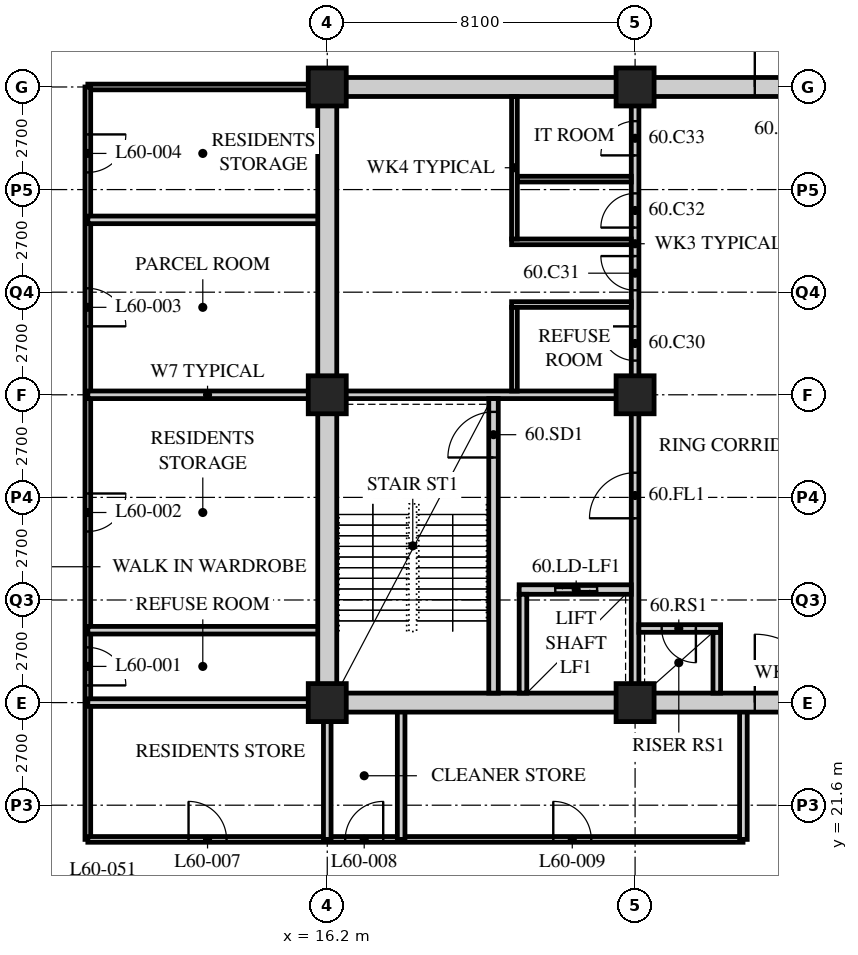
"""IFC4 building model, lengths in metres.
Left out: names, types, materials, properties, quantities, classifications, styles, units other than length and angle.
Written with IfcOpenShell. Run it as: python <this file> out.ifc"""

import sys

from ifc_helpers import new_model, si_unit, direction, frame, frame_2d, origin, origin_2d, place, context, subcontext, project, spatial, rectangle, hollow_rectangle, extrude, element, fill, save


model = new_model("IFC4")
c1 = context("Model", 3, precision=1e-05, world=origin(), true_north=direction((0.0, 1.0)))
c2 = subcontext(c1, "Body", "Model", "MODEL_VIEW")
j1 = project(units=[si_unit("LENGTHUNIT", "METRE"), si_unit("PLANEANGLEUNIT", "RADIAN")], contexts=[c1])
p1 = place(None, origin())
s1 = spatial("IfcSite", under=j1, at=p1, CompositionType="ELEMENT")
p2 = place(p1, origin())
s2 = spatial("IfcBuilding", under=s1, at=p2, CompositionType="ELEMENT")
p3 = place(p2, frame((0.0, 0.0, 231.6)))
s3 = spatial("IfcBuildingStorey", under=s2, at=p3, CompositionType="ELEMENT", Elevation=231.6)
for number, where, z_axis, x_axis in (
    (1, (16.2, 24.3, 0.0), (0.0, 0.0, 1.0), (1.0, 0.0, 0.0)),
    (2, (16.2, 32.4, 0.0), (0.0, 0.0, 1.0), (1.0, 0.0, 0.0)),
    (3, (16.2, 40.5, 0.0), (0.0, 0.0, 1.0), (1.0, 0.0, 0.0)),
    (4, (24.3, 24.3, 0.0), (0.0, 0.0, 1.0), (1.0, 0.0, 0.0)),
    (5, (24.3, 32.4, 0.0), (0.0, 0.0, 1.0), (1.0, 0.0, 0.0)),
    (6, (24.3, 40.5, 0.0), (0.0, 0.0, 1.0), (1.0, 0.0, 0.0)),
):
    element("IfcColumn", number, at=place(p3, frame(where, z_axis=z_axis, x_axis=x_axis)), inside=s3, PredefinedType="COLUMN", context=c2, shape_type="SweptSolid", body=[
        extrude(hollow_rectangle(XDim=1.0, YDim=1.0, WallThickness=0.1, at=origin_2d()), origin(), (0.0, 0.0, 1.0), 3.6),
    ])
p4 = place(p3, frame((16.0, 40.5, 0.0), z_axis=(0.0, 0.0, 1.0), x_axis=(-1.0, 0.0, 0.0)))
e7 = element("IfcWall", 7, at=p4, inside=s3, PredefinedType="PARTITIONING", context=c2, shape_type="SweptSolid", body=[
    extrude(rectangle(XDim=6.1, YDim=0.15, at=frame_2d((3.05, 0.0))), origin(), (0.0, 0.0, 1.0), 3.35),
])
p5 = place(p3, frame((9.9, 40.5, 0.0), z_axis=(0.0, 0.0, 1.0), x_axis=(0.0, -1.0, 0.0)))
e8 = element("IfcWall", 8, at=p5, inside=s3, PredefinedType="PARTITIONING", context=c2, shape_type="SweptSolid", body=[
    extrude(rectangle(XDim=19.8, YDim=0.15, at=frame_2d((9.9, 0.0))), origin(), (0.0, 0.0, 1.0), 3.35),
])
p6 = place(p5, frame((14.748, 0.0, 0.0)))
e9 = element("IfcOpeningElement", 9, at=p6, cuts=e8, PredefinedType="OPENING", context=c2, shape_type="SweptSolid", body=[
    extrude(rectangle(XDim=1.0, YDim=2.1, at=frame_2d((0.5, 1.05))), frame((0.0, 0.085, 0.0), z_axis=(0.0, -1.0, 0.0), x_axis=(1.0, 0.0, 0.0)), (0.0, 0.0, 1.0), 0.17),
])
p7 = place(p5, frame((10.698, 0.0, 0.0)))
e10 = element("IfcOpeningElement", 10, at=p7, cuts=e8, PredefinedType="OPENING", context=c2, shape_type="SweptSolid", body=[
    extrude(rectangle(XDim=1.0, YDim=2.1, at=frame_2d((0.5, 1.05))), frame((0.0, 0.085, 0.0), z_axis=(0.0, -1.0, 0.0), x_axis=(1.0, 0.0, 0.0)), (0.0, 0.0, 1.0), 0.17),
])
p8 = place(p5, frame((5.298, 0.0, 0.0)))
e11 = element("IfcOpeningElement", 11, at=p8, cuts=e8, PredefinedType="OPENING", context=c2, shape_type="SweptSolid", body=[
    extrude(rectangle(XDim=1.0, YDim=2.1, at=frame_2d((0.5, 1.05))), frame((0.0, 0.085, 0.0), z_axis=(0.0, -1.0, 0.0), x_axis=(1.0, 0.0, 0.0)), (0.0, 0.0, 1.0), 0.17),
])
p9 = place(p5, frame((1.248, 0.0, 0.0)))
e12 = element("IfcOpeningElement", 12, at=p9, cuts=e8, PredefinedType="OPENING", context=c2, shape_type="SweptSolid", body=[
    extrude(rectangle(XDim=1.0, YDim=2.1, at=frame_2d((0.5, 1.05))), frame((0.0, 0.085, 0.0), z_axis=(0.0, -1.0, 0.0), x_axis=(1.0, 0.0, 0.0)), (0.0, 0.0, 1.0), 0.17),
])
p10 = place(p3, frame((9.9, 20.7, 0.0), z_axis=(0.0, 0.0, 1.0), x_axis=(1.0, 0.0, 0.0)))
e13 = element("IfcWall", 13, at=p10, inside=s3, PredefinedType="PARTITIONING", context=c2, shape_type="SweptSolid", body=[
    extrude(rectangle(XDim=17.24, YDim=0.15, at=frame_2d((8.62, 0.0))), origin(), (0.0, 0.0, 1.0), 3.35),
])
p11 = place(p10, frame((2.65, 0.0, 0.0)))
e14 = element("IfcOpeningElement", 14, at=p11, cuts=e13, PredefinedType="OPENING", context=c2, shape_type="SweptSolid", body=[
    extrude(rectangle(XDim=1.0, YDim=2.1, at=frame_2d((0.5, 1.05))), frame((0.0, 0.085, 0.0), z_axis=(0.0, -1.0, 0.0), x_axis=(1.0, 0.0, 0.0)), (0.0, 0.0, 1.0), 0.17),
])
p12 = place(p10, frame((6.772, 0.0, 0.0)))
e15 = element("IfcOpeningElement", 15, at=p12, cuts=e13, PredefinedType="OPENING", context=c2, shape_type="SweptSolid", body=[
    extrude(rectangle(XDim=1.0, YDim=2.1, at=frame_2d((0.5, 1.05))), frame((0.0, 0.085, 0.0), z_axis=(0.0, -1.0, 0.0), x_axis=(1.0, 0.0, 0.0)), (0.0, 0.0, 1.0), 0.17),
])
p13 = place(p10, frame((12.247, 0.0, 0.0)))
e16 = element("IfcOpeningElement", 16, at=p13, cuts=e13, PredefinedType="OPENING", context=c2, shape_type="SweptSolid", body=[
    extrude(rectangle(XDim=1.0, YDim=2.1, at=frame_2d((0.5, 1.05))), frame((0.0, 0.085, 0.0), z_axis=(0.0, -1.0, 0.0), x_axis=(1.0, 0.0, 0.0)), (0.0, 0.0, 1.0), 0.17),
])
for number, where, z_axis, x_axis in (
    (17, (9.9, 32.4, 0.0), (0.0, 0.0, 1.0), (1.0, 0.0, 0.0)),
    (18, (9.9, 26.205, 0.0), (0.0, 0.0, 1.0), (1.0, 0.0, 0.0)),
    (19, (9.9, 37.003, 0.0), (0.0, 0.0, 1.0), (1.0, 0.0, 0.0)),
):
    element("IfcWall", number, at=place(p3, frame(where, z_axis=z_axis, x_axis=x_axis)), inside=s3, PredefinedType="SOLIDWALL", context=c2, shape_type="SweptSolid", body=[
        extrude(rectangle(XDim=6.3, YDim=0.2, at=frame_2d((3.15, 0.0))), origin(), (0.0, 0.0, 1.0), 3.35),
    ])
p14 = place(p3, frame((16.2, 20.7, 0.0), z_axis=(0.0, 0.0, 1.0), x_axis=(0.0, 1.0, 0.0)))
e20 = element("IfcWall", 20, at=p14, inside=s3, PredefinedType="SOLIDWALL", context=c2, shape_type="SweptSolid", body=[
    extrude(rectangle(XDim=3.6, YDim=0.2, at=frame_2d((1.8, 0.0))), origin(), (0.0, 0.0, 1.0), 2.35),
])
for number, where, z_axis, x_axis in (
    (21, (18.144, 20.7, 0.0), (0.0, 0.0, 1.0), (0.0, 1.0, 0.0)),
    (22, (27.15, 20.7, 0.0), (0.0, 0.0, 1.0), (0.0, 1.0, 0.0)),
):
    element("IfcWall", number, at=place(p3, frame(where, z_axis=z_axis, x_axis=x_axis)), inside=s3, PredefinedType="SOLIDWALL", context=c2, shape_type="SweptSolid", body=[
        extrude(rectangle(XDim=3.6, YDim=0.2, at=frame_2d((1.8, 0.0))), origin(), (0.0, 0.0, 1.0), 3.35),
    ])
p15 = place(p3, frame((9.9, 24.3, 0.0), z_axis=(0.0, 0.0, 1.0), x_axis=(1.0, 0.0, 0.0)))
e23 = element("IfcWall", 23, at=p15, inside=s3, PredefinedType="SOLIDWALL", context=c2, shape_type="SweptSolid", body=[
    extrude(rectangle(XDim=6.3, YDim=0.2, at=frame_2d((3.15, 0.0))), origin(), (0.0, 0.0, 1.0), 3.35),
])
p16 = place(p3, frame((15.95, 24.3, 0.0), z_axis=(0.0, 0.0, 1.0), x_axis=(1.0, 0.0, 0.0)))
e24 = element("IfcWall", 24, at=p16, inside=s3, PredefinedType="SOLIDWALL", context=c2, shape_type="SweptSolid", body=[
    extrude(rectangle(XDim=24.8, YDim=0.5, at=frame_2d((12.4, 0.0))), origin(), (0.0, 0.0, 1.0), 2.588),
])
p17 = place(p16, frame((11.5, 0.0, 0.0)))
e25 = element("IfcOpeningElement", 25, at=p17, cuts=e24, PredefinedType="OPENING", context=c2, shape_type="SweptSolid", body=[
    extrude(rectangle(XDim=1.8, YDim=2.4, at=frame_2d((0.9, 1.2))), frame((0.0, 0.26, 0.0), z_axis=(0.0, -1.0, 0.0), x_axis=(1.0, 0.0, 0.0)), (0.0, 0.0, 1.0), 0.52),
])
p18 = place(p3, frame((15.95, 40.5, 0.0), z_axis=(0.0, 0.0, 1.0), x_axis=(1.0, 0.0, 0.0)))
e26 = element("IfcWall", 26, at=p18, inside=s3, PredefinedType="SOLIDWALL", context=c2, shape_type="SweptSolid", body=[
    extrude(rectangle(XDim=24.8, YDim=0.5, at=frame_2d((12.4, 0.0))), origin(), (0.0, 0.0, 1.0), 2.588),
])
p19 = place(p18, frame((11.5, 0.0, 0.0)))
e27 = element("IfcOpeningElement", 27, at=p19, cuts=e26, PredefinedType="OPENING", context=c2, shape_type="SweptSolid", body=[
    extrude(rectangle(XDim=1.8, YDim=2.4, at=frame_2d((0.9, 1.2))), frame((0.0, 0.26, 0.0), z_axis=(0.0, -1.0, 0.0), x_axis=(1.0, 0.0, 0.0)), (0.0, 0.0, 1.0), 0.52),
])
p20 = place(p3, frame((16.2, 24.55, 0.0), z_axis=(0.0, 0.0, 1.0), x_axis=(0.0, 1.0, 0.0)))
e28 = element("IfcWall", 28, at=p20, inside=s3, PredefinedType="SOLIDWALL", context=c2, shape_type="SweptSolid", body=[
    extrude(rectangle(XDim=15.7, YDim=0.5, at=frame_2d((7.85, 0.0))), origin(), (0.0, 0.0, 1.0), 2.35),
])
p21 = place(p3, frame((16.45, 32.4, 0.0), z_axis=(0.0, 0.0, 1.0), x_axis=(1.0, 0.0, 0.0)))
e29 = element("IfcWall", 29, at=p21, inside=s3, PredefinedType="SOLIDWALL", context=c2, shape_type="SweptSolid", body=[
    extrude(rectangle(XDim=7.95, YDim=0.2, at=frame_2d((3.975, 0.0))), origin(), (0.0, 0.0, 1.0), 2.588),
])
p22 = place(p3, frame((24.3, 24.55, 0.0), z_axis=(0.0, 0.0, 1.0), x_axis=(0.0, 1.0, 0.0)))
e30 = element("IfcWall", 30, at=p22, inside=s3, PredefinedType="SOLIDWALL", context=c2, shape_type="SweptSolid", body=[
    extrude(rectangle(XDim=7.75, YDim=0.2, at=frame_2d((3.875, 0.0))), origin(), (0.0, 0.0, 1.0), 2.588),
])
p23 = place(p22, frame((4.6, 0.0, 0.0)))
e31 = element("IfcOpeningElement", 31, at=p23, cuts=e30, PredefinedType="OPENING", context=c2, shape_type="SweptSolid", body=[
    extrude(rectangle(XDim=1.2, YDim=2.1, at=frame_2d((0.6, 1.05))), frame((0.0, 0.11, 0.0), z_axis=(0.0, -1.0, 0.0), x_axis=(1.0, 0.0, 0.0)), (0.0, 0.0, 1.0), 0.22),
])
p24 = place(p3, frame((20.575, 24.55, 0.0), z_axis=(0.0, 0.0, 1.0), x_axis=(0.0, 1.0, 0.0)))
e32 = element("IfcWall", 32, at=p24, inside=s3, PredefinedType="SOLIDWALL", context=c2, shape_type="SweptSolid", body=[
    extrude(rectangle(XDim=7.75, YDim=0.25, at=frame_2d((3.875, 0.0))), origin(), (0.0, 0.0, 1.0), 3.35),
])
p25 = place(p24, frame((6.2, 0.0, 0.0)))
e33 = element("IfcOpeningElement", 33, at=p25, cuts=e32, PredefinedType="OPENING", context=c2, shape_type="SweptSolid", body=[
    extrude(rectangle(XDim=1.2, YDim=2.1, at=frame_2d((0.6, 1.05))), frame((0.0, 0.135, 0.0), z_axis=(0.0, -1.0, 0.0), x_axis=(1.0, 0.0, 0.0)), (0.0, 0.0, 1.0), 0.27),
])
p26 = place(p3, frame((21.25, 27.275, 0.0), z_axis=(0.0, 0.0, 1.0), x_axis=(1.0, 0.0, 0.0)))
e34 = element("IfcWall", 34, at=p26, inside=s3, PredefinedType="SOLIDWALL", context=c2, shape_type="SweptSolid", body=[
    extrude(rectangle(XDim=2.95, YDim=0.25, at=frame_2d((1.475, 0.0))), origin(), (0.0, 0.0, 1.0), 3.35),
])
p27 = place(p26, frame((0.95, 0.0, 0.0)))
e35 = element("IfcOpeningElement", 35, at=p27, cuts=e34, PredefinedType="OPENING", context=c2, shape_type="SweptSolid", body=[
    extrude(rectangle(XDim=1.1, YDim=2.4, at=frame_2d((0.55, 1.2))), frame((0.0, 0.135, 0.0), z_axis=(0.0, -1.0, 0.0), x_axis=(1.0, 0.0, 0.0)), (0.0, 0.0, 1.0), 0.27),
])
p28 = place(p3, frame((21.35, 24.55, 0.0), z_axis=(0.0, 0.0, 1.0), x_axis=(0.0, 1.0, 0.0)))
e36 = element("IfcWall", 36, at=p28, inside=s3, PredefinedType="SOLIDWALL", context=c2, shape_type="SweptSolid", body=[
    extrude(rectangle(XDim=2.6, YDim=0.2, at=frame_2d((1.3, 0.0))), origin(), (0.0, 0.0, 1.0), 3.35),
])
p29 = place(p3, frame((26.45, 24.55, 0.0), z_axis=(0.0, 0.0, 1.0), x_axis=(0.0, 1.0, 0.0)))
e37 = element("IfcWall", 37, at=p29, inside=s3, PredefinedType="SOLIDWALL", context=c2, shape_type="SweptSolid", body=[
    extrude(rectangle(XDim=1.6, YDim=0.2, at=frame_2d((0.8, 0.0))), origin(), (0.0, 0.0, 1.0), 3.35),
])
p30 = place(p3, frame((24.4, 26.25, 0.0), z_axis=(0.0, 0.0, 1.0), x_axis=(1.0, 0.0, 0.0)))
e38 = element("IfcWall", 38, at=p30, inside=s3, PredefinedType="SOLIDWALL", context=c2, shape_type="SweptSolid", body=[
    extrude(rectangle(XDim=2.15, YDim=0.2, at=frame_2d((1.075, 0.0))), origin(), (0.0, 0.0, 1.0), 3.35),
])
p31 = place(p30, frame((0.6, 0.0, 0.0)))
e39 = element("IfcOpeningElement", 39, at=p31, cuts=e38, PredefinedType="OPENING", context=c2, shape_type="SweptSolid", body=[
    extrude(rectangle(XDim=0.9, YDim=2.1, at=frame_2d((0.45, 1.05))), frame((0.0, 0.11, 0.0), z_axis=(0.0, -1.0, 0.0), x_axis=(1.0, 0.0, 0.0)), (0.0, 0.0, 1.0), 0.22),
])
p32 = place(p3, frame((24.3, 32.5, 0.0), z_axis=(0.0, 0.0, 1.0), x_axis=(0.0, 1.0, 0.0)))
e40 = element("IfcWall", 40, at=p32, inside=s3, PredefinedType="PARTITIONING", context=c2, shape_type="SweptSolid", body=[
    extrude(rectangle(XDim=7.75, YDim=0.2, at=frame_2d((3.875, 0.0))), origin(), (0.0, 0.0, 1.0), 2.588),
])
p33 = place(p32, frame((0.8, 0.0, 0.0)))
e41 = element("IfcOpeningElement", 41, at=p33, cuts=e40, PredefinedType="OPENING", context=c2, shape_type="SweptSolid", body=[
    extrude(rectangle(XDim=0.9, YDim=2.1, at=frame_2d((0.45, 1.05))), frame((0.0, 0.11, 0.0), z_axis=(0.0, -1.0, 0.0), x_axis=(1.0, 0.0, 0.0)), (0.0, 0.0, 1.0), 0.22),
])
p34 = place(p32, frame((2.65, 0.0, 0.0)))
e42 = element("IfcOpeningElement", 42, at=p34, cuts=e40, PredefinedType="OPENING", context=c2, shape_type="SweptSolid", body=[
    extrude(rectangle(XDim=0.9, YDim=2.1, at=frame_2d((0.45, 1.05))), frame((0.0, 0.11, 0.0), z_axis=(0.0, -1.0, 0.0), x_axis=(1.0, 0.0, 0.0)), (0.0, 0.0, 1.0), 0.22),
])
p35 = place(p32, frame((4.3, 0.0, 0.0)))
e43 = element("IfcOpeningElement", 43, at=p35, cuts=e40, PredefinedType="OPENING", context=c2, shape_type="SweptSolid", body=[
    extrude(rectangle(XDim=0.9, YDim=2.1, at=frame_2d((0.45, 1.05))), frame((0.0, 0.11, 0.0), z_axis=(0.0, -1.0, 0.0), x_axis=(1.0, 0.0, 0.0)), (0.0, 0.0, 1.0), 0.22),
])
p36 = place(p32, frame((6.2, 0.0, 0.0)))
e44 = element("IfcOpeningElement", 44, at=p36, cuts=e40, PredefinedType="OPENING", context=c2, shape_type="SweptSolid", body=[
    extrude(rectangle(XDim=0.9, YDim=2.1, at=frame_2d((0.45, 1.05))), frame((0.0, 0.11, 0.0), z_axis=(0.0, -1.0, 0.0), x_axis=(1.0, 0.0, 0.0)), (0.0, 0.0, 1.0), 0.22),
])
for number, where, z_axis, x_axis in (
    (45, (21.05, 34.775, 0.0), (0.0, 0.0, 1.0), (1.0, 0.0, 0.0)),
    (46, (21.05, 36.425, 0.0), (0.0, 0.0, 1.0), (1.0, 0.0, 0.0)),
):
    element("IfcWall", number, at=place(p3, frame(where, z_axis=z_axis, x_axis=x_axis)), inside=s3, PredefinedType="PARTITIONING", context=c2, shape_type="SweptSolid", body=[
        extrude(rectangle(XDim=3.15, YDim=0.15, at=frame_2d((1.575, 0.0))), origin(), (0.0, 0.0, 1.0), 3.35),
    ])
p37 = place(p3, frame((21.2, 38.075, 0.0), z_axis=(0.0, 0.0, 1.0), x_axis=(1.0, 0.0, 0.0)))
e47 = element("IfcWall", 47, at=p37, inside=s3, PredefinedType="PARTITIONING", context=c2, shape_type="SweptSolid", body=[
    extrude(rectangle(XDim=3.0, YDim=0.15, at=frame_2d((1.5, 0.0))), origin(), (0.0, 0.0, 1.0), 3.35),
])
p38 = place(p3, frame((21.125, 32.5, 0.0), z_axis=(0.0, 0.0, 1.0), x_axis=(0.0, 1.0, 0.0)))
e48 = element("IfcWall", 48, at=p38, inside=s3, PredefinedType="PARTITIONING", context=c2, shape_type="SweptSolid", body=[
    extrude(rectangle(XDim=2.2, YDim=0.15, at=frame_2d((1.1, 0.0))), origin(), (0.0, 0.0, 1.0), 3.35),
])
p39 = place(p3, frame((21.125, 36.5, 0.0), z_axis=(0.0, 0.0, 1.0), x_axis=(0.0, 1.0, 0.0)))
e49 = element("IfcWall", 49, at=p39, inside=s3, PredefinedType="PARTITIONING", context=c2, shape_type="SweptSolid", body=[
    extrude(rectangle(XDim=3.75, YDim=0.15, at=frame_2d((1.875, 0.0))), origin(), (0.0, 0.0, 1.0), 3.35),
])
p40 = place(p6, origin())
e50 = element("IfcDoor", 50, at=p40, inside=s3, OperationType="SINGLE_SWING_RIGHT", PredefinedType="DOOR", context=c2, shape_type="SweptSolid", body=[
    extrude(rectangle(XDim=1.0, YDim=2.1, at=frame_2d((0.5, 1.05))), frame((0.0, 0.025, 0.0), z_axis=(0.0, -1.0, 0.0), x_axis=(1.0, 0.0, 0.0)), (0.0, 0.0, 1.0), 0.05),
])
fill(e9, e50)
p41 = place(p7, origin())
e51 = element("IfcDoor", 51, at=p41, inside=s3, OperationType="SINGLE_SWING_LEFT", PredefinedType="DOOR", context=c2, shape_type="SweptSolid", body=[
    extrude(rectangle(XDim=1.0, YDim=2.1, at=frame_2d((0.5, 1.05))), frame((0.0, 0.025, 0.0), z_axis=(0.0, -1.0, 0.0), x_axis=(1.0, 0.0, 0.0)), (0.0, 0.0, 1.0), 0.05),
])
fill(e10, e51)
p42 = place(p8, origin())
e52 = element("IfcDoor", 52, at=p42, inside=s3, OperationType="SINGLE_SWING_RIGHT", PredefinedType="DOOR", context=c2, shape_type="SweptSolid", body=[
    extrude(rectangle(XDim=1.0, YDim=2.1, at=frame_2d((0.5, 1.05))), frame((0.0, 0.025, 0.0), z_axis=(0.0, -1.0, 0.0), x_axis=(1.0, 0.0, 0.0)), (0.0, 0.0, 1.0), 0.05),
])
fill(e11, e52)
p43 = place(p9, origin())
e53 = element("IfcDoor", 53, at=p43, inside=s3, OperationType="SINGLE_SWING_LEFT", PredefinedType="DOOR", context=c2, shape_type="SweptSolid", body=[
    extrude(rectangle(XDim=1.0, YDim=2.1, at=frame_2d((0.5, 1.05))), frame((0.0, 0.025, 0.0), z_axis=(0.0, -1.0, 0.0), x_axis=(1.0, 0.0, 0.0)), (0.0, 0.0, 1.0), 0.05),
])
fill(e12, e53)
p44 = place(p11, origin())
e54 = element("IfcDoor", 54, at=p44, inside=s3, OperationType="SINGLE_SWING_LEFT", PredefinedType="DOOR", context=c2, shape_type="SweptSolid", body=[
    extrude(rectangle(XDim=1.0, YDim=2.1, at=frame_2d((0.5, 1.05))), frame((0.0, 0.025, 0.0), z_axis=(0.0, -1.0, 0.0), x_axis=(1.0, 0.0, 0.0)), (0.0, 0.0, 1.0), 0.05),
])
fill(e14, e54)
p45 = place(p12, origin())
e55 = element("IfcDoor", 55, at=p45, inside=s3, OperationType="SINGLE_SWING_RIGHT", PredefinedType="DOOR", context=c2, shape_type="SweptSolid", body=[
    extrude(rectangle(XDim=1.0, YDim=2.1, at=frame_2d((0.5, 1.05))), frame((0.0, 0.025, 0.0), z_axis=(0.0, -1.0, 0.0), x_axis=(1.0, 0.0, 0.0)), (0.0, 0.0, 1.0), 0.05),
])
fill(e15, e55)
p46 = place(p13, origin())
e56 = element("IfcDoor", 56, at=p46, inside=s3, OperationType="SINGLE_SWING_LEFT", PredefinedType="DOOR", context=c2, shape_type="SweptSolid", body=[
    extrude(rectangle(XDim=1.0, YDim=2.1, at=frame_2d((0.5, 1.05))), frame((0.0, 0.025, 0.0), z_axis=(0.0, -1.0, 0.0), x_axis=(1.0, 0.0, 0.0)), (0.0, 0.0, 1.0), 0.05),
])
fill(e16, e56)
p47 = place(p33, origin())
e57 = element("IfcDoor", 57, at=p47, inside=s3, OperationType="SINGLE_SWING_RIGHT", PredefinedType="DOOR", context=c2, shape_type="SweptSolid", body=[
    extrude(rectangle(XDim=0.9, YDim=2.1, at=frame_2d((0.45, 1.05))), frame((0.0, 0.025, 0.0), z_axis=(0.0, -1.0, 0.0), x_axis=(1.0, 0.0, 0.0)), (0.0, 0.0, 1.0), 0.05),
])
fill(e41, e57)
p48 = place(p34, origin())
e58 = element("IfcDoor", 58, at=p48, inside=s3, OperationType="SINGLE_SWING_RIGHT", PredefinedType="DOOR", context=c2, shape_type="SweptSolid", body=[
    extrude(rectangle(XDim=0.9, YDim=2.1, at=frame_2d((0.45, 1.05))), frame((0.0, 0.025, 0.0), z_axis=(0.0, -1.0, 0.0), x_axis=(1.0, 0.0, 0.0)), (0.0, 0.0, 1.0), 0.05),
])
fill(e42, e58)
p49 = place(p35, origin())
e59 = element("IfcDoor", 59, at=p49, inside=s3, OperationType="SINGLE_SWING_LEFT", PredefinedType="DOOR", context=c2, shape_type="SweptSolid", body=[
    extrude(rectangle(XDim=0.9, YDim=2.1, at=frame_2d((0.45, 1.05))), frame((0.0, 0.025, 0.0), z_axis=(0.0, -1.0, 0.0), x_axis=(1.0, 0.0, 0.0)), (0.0, 0.0, 1.0), 0.05),
])
fill(e43, e59)
p50 = place(p36, origin())
e60 = element("IfcDoor", 60, at=p50, inside=s3, OperationType="SINGLE_SWING_LEFT", PredefinedType="DOOR", context=c2, shape_type="SweptSolid", body=[
    extrude(rectangle(XDim=0.9, YDim=2.1, at=frame_2d((0.45, 1.05))), frame((0.0, 0.025, 0.0), z_axis=(0.0, -1.0, 0.0), x_axis=(1.0, 0.0, 0.0)), (0.0, 0.0, 1.0), 0.05),
])
fill(e44, e60)
p51 = place(p25, origin())
e61 = element("IfcDoor", 61, at=p51, inside=s3, OperationType="SINGLE_SWING_LEFT", PredefinedType="DOOR", context=c2, shape_type="SweptSolid", body=[
    extrude(rectangle(XDim=1.2, YDim=2.1, at=frame_2d((0.6, 1.05))), frame((0.0, 0.025, 0.0), z_axis=(0.0, -1.0, 0.0), x_axis=(1.0, 0.0, 0.0)), (0.0, 0.0, 1.0), 0.05),
])
fill(e33, e61)
p52 = place(p23, origin())
e62 = element("IfcDoor", 62, at=p52, inside=s3, OperationType="SINGLE_SWING_LEFT", PredefinedType="DOOR", context=c2, shape_type="SweptSolid", body=[
    extrude(rectangle(XDim=1.2, YDim=2.1, at=frame_2d((0.6, 1.05))), frame((0.0, 0.025, 0.0), z_axis=(0.0, -1.0, 0.0), x_axis=(1.0, 0.0, 0.0)), (0.0, 0.0, 1.0), 0.05),
])
fill(e31, e62)
p53 = place(p31, origin())
e63 = element("IfcDoor", 63, at=p53, inside=s3, OperationType="SINGLE_SWING_LEFT", PredefinedType="DOOR", context=c2, shape_type="SweptSolid", body=[
    extrude(rectangle(XDim=0.9, YDim=2.1, at=frame_2d((0.45, 1.05))), frame((0.0, 0.025, 0.0), z_axis=(0.0, -1.0, 0.0), x_axis=(1.0, 0.0, 0.0)), (0.0, 0.0, 1.0), 0.05),
])
fill(e39, e63)
p54 = place(p27, origin())
e64 = element("IfcDoor", 64, at=p54, inside=s3, OperationType="DOUBLE_DOOR_SLIDING", PredefinedType="DOOR", context=c2, shape_type="SweptSolid", body=[
    extrude(rectangle(XDim=1.1, YDim=2.4, at=frame_2d((0.55, 1.2))), frame((0.0, 0.025, 0.0), z_axis=(0.0, -1.0, 0.0), x_axis=(1.0, 0.0, 0.0)), (0.0, 0.0, 1.0), 0.05),
])
fill(e35, e64)
p55 = place(p17, origin())
e65 = element("IfcDoor", 65, at=p55, inside=s3, OperationType="DOUBLE_DOOR_SINGLE_SWING", PredefinedType="DOOR", context=c2, shape_type="SweptSolid", body=[
    extrude(rectangle(XDim=1.8, YDim=2.4, at=frame_2d((0.9, 1.2))), frame((0.0, 0.025, 0.0), z_axis=(0.0, -1.0, 0.0), x_axis=(1.0, 0.0, 0.0)), (0.0, 0.0, 1.0), 0.05),
])
fill(e25, e65)
p56 = place(p19, origin())
e66 = element("IfcDoor", 66, at=p56, inside=s3, OperationType="DOUBLE_DOOR_SINGLE_SWING", PredefinedType="DOOR", context=c2, shape_type="SweptSolid", body=[
    extrude(rectangle(XDim=1.8, YDim=2.4, at=frame_2d((0.9, 1.2))), frame((0.0, 0.025, 0.0), z_axis=(0.0, -1.0, 0.0), x_axis=(1.0, 0.0, 0.0)), (0.0, 0.0, 1.0), 0.05),
])
fill(e27, e66)
save(model, sys.argv[1])
